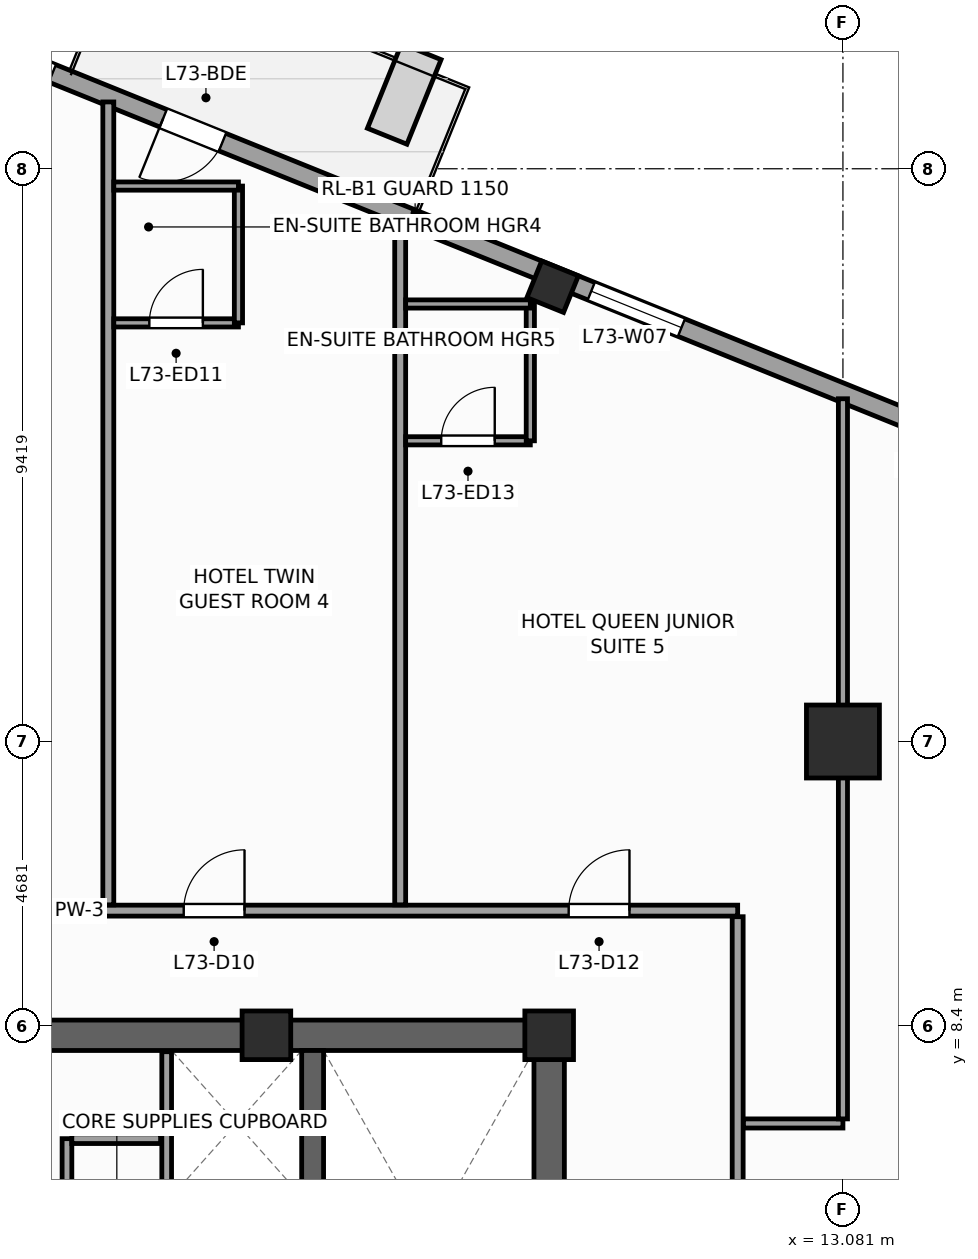
"""IFC4 building model, lengths in metres.
Left out: names, types, materials, properties, quantities, classifications, styles, units other than length and angle.
Written with IfcOpenShell. Run it as: python <this file> out.ifc"""

import sys

from ifc_helpers import new_model, si_unit, direction, frame, frame_2d, origin, origin_2d, place, context, subcontext, project, spatial, rectangle, extrude, source, transform, mapped, element, fill, save


model = new_model("IFC4")
c1 = context("Model", 3, precision=1e-05, world=origin(), true_north=direction((0.0, 1.0)))
c2 = subcontext(c1, "Body", "Model", "MODEL_VIEW")
j1 = project(units=[si_unit("LENGTHUNIT", "METRE"), si_unit("PLANEANGLEUNIT", "RADIAN")], contexts=[c1])
p1 = place(None, origin())
s1 = spatial("IfcSite", under=j1, at=p1, CompositionType="ELEMENT")
p2 = place(p1, origin())
s2 = spatial("IfcBuilding", under=s1, at=p2, CompositionType="ELEMENT")
p3 = place(p2, frame((0.0, 0.0, 297.6)))
s3 = spatial("IfcBuildingStorey", under=s2, at=p3, CompositionType="ELEMENT", Elevation=297.6)
p4 = place(p3, frame((-8.5, 8.25, 0.0), z_axis=(0.0, 0.0, 1.0), x_axis=(1.0, 0.0, 0.0)))
e1 = element("IfcWall", 1, at=p4, inside=s3, PredefinedType="SHEAR", context=c2, shape_type="SweptSolid", body=[
    extrude(rectangle(XDim=17.0, YDim=0.5, at=frame_2d((8.5, 0.0))), origin(), (0.0, 0.0, 1.0), 3.6),
])
p5 = place(p3, frame((8.25, -8.0, 0.0), z_axis=(0.0, 0.0, 1.0), x_axis=(0.0, 1.0, 0.0)))
e2 = element("IfcWall", 2, at=p5, inside=s3, PredefinedType="SHEAR", context=c2, shape_type="SweptSolid", body=[
    extrude(rectangle(XDim=16.0, YDim=0.5, at=frame_2d((8.0, 0.0))), origin(), (0.0, 0.0, 1.0), 3.6),
])
p6 = place(p5, frame((4.69, 0.0, 0.0)))
e3 = element("IfcOpeningElement", 3, at=p6, cuts=e2, PredefinedType="OPENING", context=c2, shape_type="SweptSolid", body=[
    extrude(rectangle(XDim=1.3, YDim=2.2, at=frame_2d((0.65, 1.1))), frame((0.0, 0.26, 0.0), z_axis=(0.0, -1.0, 0.0), x_axis=(1.0, 0.0, 0.0)), (0.0, 0.0, 1.0), 0.52),
])
p7 = place(p3, frame((4.36, -8.0, 0.0), z_axis=(0.0, 0.0, 1.0), x_axis=(0.0, 1.0, 0.0)))
e4 = element("IfcWall", 4, at=p7, inside=s3, PredefinedType="SHEAR", context=c2, shape_type="SweptSolid", body=[
    extrude(rectangle(XDim=16.0, YDim=0.36, at=frame_2d((8.0, 0.0))), origin(), (0.0, 0.0, 1.0), 3.6),
])
m1 = source(origin(), c2, "Body", "SweptSolid", [
    extrude(rectangle(XDim=0.8, YDim=0.8, at=origin_2d()), origin(), (0.0, 0.0, 1.0), 3.6),
])
for number, where, z_axis, x_axis in (
    (5, (8.25, 8.25, 0.0), (0.0, 0.0, 1.0), (1.0, 0.0, 0.0)),
    (6, (3.6, 8.25, 0.0), (0.0, 0.0, 1.0), (1.0, 0.0, 0.0)),
):
    element("IfcColumn", number, at=place(p3, frame(where, z_axis=z_axis, x_axis=x_axis)), inside=s3, PredefinedType="PILASTER", context=c2, shape_type="MappedRepresentation", body=[
        mapped(m1, transform((0.0, 0.0, 0.0), scale=1.0)),
    ])
m2 = source(origin(), c2, "Body", "SweptSolid", [
    extrude(rectangle(XDim=1.2, YDim=1.2, at=origin_2d()), origin(), (0.0, 0.0, 1.0), 3.6),
])
p8 = place(p3, frame((13.081, 13.081, 0.0), z_axis=(0.0, 0.0, 1.0), x_axis=(1.0, 0.0, 0.0)))
e7 = element("IfcColumn", 7, at=p8, inside=s3, PredefinedType="COLUMN", context=c2, shape_type="MappedRepresentation", body=[
    mapped(m2, transform((0.0, 0.0, 0.0), scale=1.0)),
])
m3 = source(origin(), c2, "Body", "SweptSolid", [
    extrude(rectangle(XDim=0.65, YDim=0.65, at=origin_2d()), origin(), (0.0, 0.0, 1.0), 3.6),
])
p9 = place(p3, frame((8.307, 20.56, 0.0), z_axis=(0.0, 0.0, 1.0), x_axis=(0.374606593416, 0.927183854567, 0.0)))
e8 = element("IfcColumn", 8, at=p9, inside=s3, PredefinedType="COLUMN", context=c2, shape_type="MappedRepresentation", body=[
    mapped(m3, transform((0.0, 0.0, 0.0), scale=1.0)),
])
p10 = place(p3, frame((23.813, 14.479, 0.0), z_axis=(0.0, 0.0, 1.0), x_axis=(-0.927182657188, 0.374609557019, 0.0)))
e9 = element("IfcWall", 9, at=p10, inside=s3, PredefinedType="STANDARD", context=c2, shape_type="SweptSolid", body=[
    extrude(rectangle(XDim=33.31, YDim=0.31, at=frame_2d((16.655, 0.0))), origin(), (0.0, 0.0, 1.0), 2.75),
])
p11 = place(p10, frame((22.58, 0.0, 0.0)))
e10 = element("IfcOpeningElement", 10, at=p11, cuts=e9, PredefinedType="OPENING", context=c2, shape_type="SweptSolid", body=[
    extrude(rectangle(XDim=1.05, YDim=2.25, at=frame_2d((0.525, 1.125))), frame((0.0, 0.165, 0.0), z_axis=(0.0, -1.0, 0.0), x_axis=(1.0, 0.0, 0.0)), (0.0, 0.0, 1.0), 0.33),
])
p12 = place(p10, frame((3.197, 0.0, 0.47)))
e11 = element("IfcOpeningElement", 11, at=p12, cuts=e9, PredefinedType="OPENING", context=c2, shape_type="SweptSolid", body=[
    extrude(rectangle(XDim=1.6, YDim=2.1, at=frame_2d((0.8, 1.05))), frame((0.0, 0.165, 0.0), z_axis=(0.0, -1.0, 0.0), x_axis=(1.0, 0.0, 0.0)), (0.0, 0.0, 1.0), 0.33),
])
p13 = place(p10, frame((8.86, 0.0, 0.47)))
e12 = element("IfcOpeningElement", 12, at=p13, cuts=e9, PredefinedType="OPENING", context=c2, shape_type="SweptSolid", body=[
    extrude(rectangle(XDim=1.6, YDim=2.1, at=frame_2d((0.8, 1.05))), frame((0.0, 0.165, 0.0), z_axis=(0.0, -1.0, 0.0), x_axis=(1.0, 0.0, 0.0)), (0.0, 0.0, 1.0), 0.33),
])
p14 = place(p10, frame((14.439, 0.0, 0.47)))
e13 = element("IfcOpeningElement", 13, at=p14, cuts=e9, PredefinedType="OPENING", context=c2, shape_type="SweptSolid", body=[
    extrude(rectangle(XDim=1.6, YDim=2.1, at=frame_2d((0.8, 1.05))), frame((0.0, 0.165, 0.0), z_axis=(0.0, -1.0, 0.0), x_axis=(1.0, 0.0, 0.0)), (0.0, 0.0, 1.0), 0.33),
])
p15 = place(p10, frame((25.597, 0.0, 0.47)))
e14 = element("IfcOpeningElement", 14, at=p15, cuts=e9, PredefinedType="OPENING", context=c2, shape_type="SweptSolid", body=[
    extrude(rectangle(XDim=1.6, YDim=2.1, at=frame_2d((0.8, 1.05))), frame((0.0, 0.165, 0.0), z_axis=(0.0, -1.0, 0.0), x_axis=(1.0, 0.0, 0.0)), (0.0, 0.0, 1.0), 0.33),
])
p16 = place(p3, frame((1.96, 4.58, 0.0), z_axis=(0.0, 0.0, 1.0), x_axis=(0.0, 1.0, 0.0)))
e15 = element("IfcWall", 15, at=p16, inside=s3, PredefinedType="PARTITIONING", context=c2, shape_type="SweptSolid", body=[
    extrude(rectangle(XDim=3.4, YDim=0.16, at=frame_2d((1.7, 0.0))), origin(), (0.0, 0.0, 1.0), 3.35),
])
p17 = place(p3, frame((0.32, 4.6, 0.0), z_axis=(0.0, 0.0, 1.0), x_axis=(0.0, 1.0, 0.0)))
e16 = element("IfcWall", 16, at=p17, inside=s3, PredefinedType="PARTITIONING", context=c2, shape_type="SweptSolid", body=[
    extrude(rectangle(XDim=1.95, YDim=0.16, at=frame_2d((0.975, 0.0))), origin(), (0.0, 0.0, 1.0), 3.35),
])
p18 = place(p3, frame((0.4, 6.55, 0.0), z_axis=(0.0, 0.0, 1.0), x_axis=(1.0, 0.0, 0.0)))
e17 = element("IfcWall", 17, at=p18, inside=s3, PredefinedType="PARTITIONING", context=c2, shape_type="SweptSolid", body=[
    extrude(rectangle(XDim=1.46, YDim=0.16, at=frame_2d((0.73, 0.0))), origin(), (0.0, 0.0, 1.0), 3.35),
])
p19 = place(p3, frame((-10.3, 10.3, 0.0), z_axis=(0.0, 0.0, 1.0), x_axis=(1.0, 0.0, 0.0)))
e18 = element("IfcWall", 18, at=p19, inside=s3, PredefinedType="PARTITIONING", context=c2, shape_type="SweptSolid", body=[
    extrude(rectangle(XDim=21.65, YDim=0.18, at=frame_2d((10.825, 0.0))), origin(), (0.0, 0.0, 1.0), 3.35),
])
p20 = place(p19, frame((2.564, 0.0, 0.0)))
e19 = element("IfcOpeningElement", 19, at=p20, cuts=e18, PredefinedType="OPENING", context=c2, shape_type="SweptSolid", body=[
    extrude(rectangle(XDim=1.0, YDim=2.15, at=frame_2d((0.5, 1.075))), frame((0.0, 0.1, 0.0), z_axis=(0.0, -1.0, 0.0), x_axis=(1.0, 0.0, 0.0)), (0.0, 0.0, 1.0), 0.2),
])
p21 = place(p19, frame((8.05, 0.0, 0.0)))
e20 = element("IfcOpeningElement", 20, at=p21, cuts=e18, PredefinedType="OPENING", context=c2, shape_type="SweptSolid", body=[
    extrude(rectangle(XDim=1.0, YDim=2.15, at=frame_2d((0.5, 1.075))), frame((0.0, 0.1, 0.0), z_axis=(0.0, -1.0, 0.0), x_axis=(1.0, 0.0, 0.0)), (0.0, 0.0, 1.0), 0.2),
])
p22 = place(p19, frame((12.54, 0.0, 0.0)))
e21 = element("IfcOpeningElement", 21, at=p22, cuts=e18, PredefinedType="OPENING", context=c2, shape_type="SweptSolid", body=[
    extrude(rectangle(XDim=1.0, YDim=2.15, at=frame_2d((0.5, 1.075))), frame((0.0, 0.1, 0.0), z_axis=(0.0, -1.0, 0.0), x_axis=(1.0, 0.0, 0.0)), (0.0, 0.0, 1.0), 0.2),
])
p23 = place(p19, frame((18.871, 0.0, 0.0)))
e22 = element("IfcOpeningElement", 22, at=p23, cuts=e18, PredefinedType="OPENING", context=c2, shape_type="SweptSolid", body=[
    extrude(rectangle(XDim=1.0, YDim=2.15, at=frame_2d((0.5, 1.075))), frame((0.0, 0.1, 0.0), z_axis=(0.0, -1.0, 0.0), x_axis=(1.0, 0.0, 0.0)), (0.0, 0.0, 1.0), 0.2),
])
p24 = place(p3, frame((11.35, -12.35, 0.0), z_axis=(0.0, 0.0, 1.0), x_axis=(0.0, 1.0, 0.0)))
e23 = element("IfcWall", 23, at=p24, inside=s3, PredefinedType="PARTITIONING", context=c2, shape_type="SweptSolid", body=[
    extrude(rectangle(XDim=22.55, YDim=0.18, at=frame_2d((11.275, 0.0))), origin(), (0.0, 0.0, 1.0), 3.35),
])
p25 = place(p24, frame((17.15, 0.0, 0.0)))
e24 = element("IfcOpeningElement", 24, at=p25, cuts=e23, PredefinedType="OPENING", context=c2, shape_type="SweptSolid", body=[
    extrude(rectangle(XDim=1.0, YDim=2.15, at=frame_2d((0.5, 1.075))), frame((0.0, 0.1, 0.0), z_axis=(0.0, -1.0, 0.0), x_axis=(1.0, 0.0, 0.0)), (0.0, 0.0, 1.0), 0.2),
])
p26 = place(p24, frame((13.5, 0.0, 0.0)))
e25 = element("IfcOpeningElement", 25, at=p26, cuts=e23, PredefinedType="OPENING", context=c2, shape_type="SweptSolid", body=[
    extrude(rectangle(XDim=1.0, YDim=2.15, at=frame_2d((0.5, 1.075))), frame((0.0, 0.1, 0.0), z_axis=(0.0, -1.0, 0.0), x_axis=(1.0, 0.0, 0.0)), (0.0, 0.0, 1.0), 0.2),
])
p27 = place(p24, frame((9.5, 0.0, 0.0)))
e26 = element("IfcOpeningElement", 26, at=p27, cuts=e23, PredefinedType="OPENING", context=c2, shape_type="SweptSolid", body=[
    extrude(rectangle(XDim=1.0, YDim=2.15, at=frame_2d((0.5, 1.075))), frame((0.0, 0.1, 0.0), z_axis=(0.0, -1.0, 0.0), x_axis=(1.0, 0.0, 0.0)), (0.0, 0.0, 1.0), 0.2),
])
p28 = place(p24, frame((6.35, 0.0, 0.0)))
e27 = element("IfcOpeningElement", 27, at=p28, cuts=e23, PredefinedType="OPENING", context=c2, shape_type="SweptSolid", body=[
    extrude(rectangle(XDim=1.0, YDim=2.15, at=frame_2d((0.5, 1.075))), frame((0.0, 0.1, 0.0), z_axis=(0.0, -1.0, 0.0), x_axis=(1.0, 0.0, 0.0)), (0.0, 0.0, 1.0), 0.2),
])
p29 = place(p24, frame((2.439, 0.0, 0.0)))
e28 = element("IfcOpeningElement", 28, at=p29, cuts=e23, PredefinedType="OPENING", context=c2, shape_type="SweptSolid", body=[
    extrude(rectangle(XDim=1.0, YDim=2.15, at=frame_2d((0.5, 1.075))), frame((0.0, 0.1, 0.0), z_axis=(0.0, -1.0, 0.0), x_axis=(1.0, 0.0, 0.0)), (0.0, 0.0, 1.0), 0.2),
])
p30 = place(p3, frame((1.0, 10.395, 0.0), z_axis=(0.0, 0.0, 1.0), x_axis=(0.0, 1.0, 0.0)))
e29 = element("IfcWall", 29, at=p30, inside=s3, PredefinedType="PARTITIONING", context=c2, shape_type="SweptSolid", body=[
    extrude(rectangle(XDim=13.204, YDim=0.18, at=frame_2d((6.602, 0.0))), origin(), (0.0, 0.0, 1.0), 3.35),
])
p31 = place(p3, frame((5.8, 10.395, 0.0), z_axis=(0.0, 0.0, 1.0), x_axis=(0.0, 1.0, 0.0)))
e30 = element("IfcWall", 30, at=p31, inside=s3, PredefinedType="PARTITIONING", context=c2, shape_type="SweptSolid", body=[
    extrude(rectangle(XDim=11.264, YDim=0.18, at=frame_2d((5.632, 0.0))), origin(), (0.0, 0.0, 1.0), 3.35),
])
p32 = place(p3, frame((11.445, 6.8, 0.0), z_axis=(0.0, 0.0, 1.0), x_axis=(1.0, 0.0, 0.0)))
e31 = element("IfcWall", 31, at=p32, inside=s3, PredefinedType="PARTITIONING", context=c2, shape_type="SweptSolid", body=[
    extrude(rectangle(XDim=1.636, YDim=0.15, at=frame_2d((0.818, 0.0))), origin(), (0.0, 0.0, 1.0), 3.35),
])
p33 = place(p3, frame((13.081, 6.875, 0.0), z_axis=(0.0, 0.0, 1.0), x_axis=(0.0, 1.0, 0.0)))
e32 = element("IfcWall", 32, at=p33, inside=s3, PredefinedType="PARTITIONING", context=c2, shape_type="SweptSolid", body=[
    extrude(rectangle(XDim=11.843, YDim=0.15, at=frame_2d((5.921, 0.0))), origin(), (0.0, 0.0, 1.0), 2.45),
])
p34 = place(p3, frame((1.09, 19.965, 0.0), z_axis=(0.0, 0.0, 1.0), x_axis=(1.0, 0.0, 0.0)))
e33 = element("IfcWall", 33, at=p34, inside=s3, PredefinedType="PARTITIONING", context=c2, shape_type="SweptSolid", body=[
    extrude(rectangle(XDim=2.05, YDim=0.135, at=frame_2d((1.025, 0.0))), origin(), (0.0, 0.0, 1.0), 3.35),
])
p35 = place(p34, frame((0.585, 0.0, 0.0)))
e34 = element("IfcOpeningElement", 34, at=p35, cuts=e33, PredefinedType="OPENING", context=c2, shape_type="SweptSolid", body=[
    extrude(rectangle(XDim=0.88, YDim=2.1, at=frame_2d((0.44, 1.05))), frame((0.0, 0.078, 0.0), z_axis=(0.0, -1.0, 0.0), x_axis=(1.0, 0.0, 0.0)), (0.0, 0.0, 1.0), 0.155),
])
p36 = place(p3, frame((3.14, 19.965, 0.0), z_axis=(0.0, 0.0, 1.0), x_axis=(0.0, 1.0, 0.0)))
e35 = element("IfcWall", 35, at=p36, inside=s3, PredefinedType="PARTITIONING", context=c2, shape_type="SweptSolid", body=[
    extrude(rectangle(XDim=2.25, YDim=0.135, at=frame_2d((1.125, 0.0))), origin(), (0.0, 0.0, 1.0), 3.35),
])
p37 = place(p3, frame((1.09, 22.215, 0.0), z_axis=(0.0, 0.0, 1.0), x_axis=(1.0, 0.0, 0.0)))
e36 = element("IfcWall", 36, at=p37, inside=s3, PredefinedType="PARTITIONING", context=c2, shape_type="SweptSolid", body=[
    extrude(rectangle(XDim=2.05, YDim=0.135, at=frame_2d((1.025, 0.0))), origin(), (0.0, 0.0, 1.0), 3.35),
])
p38 = place(p3, frame((5.89, 18.026, 0.0), z_axis=(0.0, 0.0, 1.0), x_axis=(1.0, 0.0, 0.0)))
e37 = element("IfcWall", 37, at=p38, inside=s3, PredefinedType="PARTITIONING", context=c2, shape_type="SweptSolid", body=[
    extrude(rectangle(XDim=2.05, YDim=0.135, at=frame_2d((1.025, 0.0))), origin(), (0.0, 0.0, 1.0), 2.95),
])
p39 = place(p38, frame((0.585, 0.0, 0.0)))
e38 = element("IfcOpeningElement", 38, at=p39, cuts=e37, PredefinedType="OPENING", context=c2, shape_type="SweptSolid", body=[
    extrude(rectangle(XDim=0.88, YDim=2.1, at=frame_2d((0.44, 1.05))), frame((0.0, 0.078, 0.0), z_axis=(0.0, -1.0, 0.0), x_axis=(1.0, 0.0, 0.0)), (0.0, 0.0, 1.0), 0.155),
])
p40 = place(p3, frame((7.94, 18.026, 0.0), z_axis=(0.0, 0.0, 1.0), x_axis=(0.0, 1.0, 0.0)))
e39 = element("IfcWall", 39, at=p40, inside=s3, PredefinedType="PARTITIONING", context=c2, shape_type="SweptSolid", body=[
    extrude(rectangle(XDim=2.25, YDim=0.135, at=frame_2d((1.125, 0.0))), origin(), (0.0, 0.0, 1.0), 3.35),
])
p41 = place(p3, frame((5.89, 20.276, 0.0), z_axis=(0.0, 0.0, 1.0), x_axis=(1.0, 0.0, 0.0)))
e40 = element("IfcWall", 40, at=p41, inside=s3, PredefinedType="PARTITIONING", context=c2, shape_type="SweptSolid", body=[
    extrude(rectangle(XDim=2.05, YDim=0.135, at=frame_2d((1.025, 0.0))), origin(), (0.0, 0.0, 1.0), 3.35),
])
m4 = source(origin(), c2, "Body", "SweptSolid", [
    extrude(rectangle(XDim=1.05, YDim=2.25, at=frame_2d((0.525, 1.125))), frame((0.0, 0.025, 0.0), z_axis=(0.0, -1.0, 0.0), x_axis=(1.0, 0.0, 0.0)), (0.0, 0.0, 1.0), 0.05),
])
p42 = place(p11, origin())
e41 = element("IfcDoor", 41, at=p42, inside=s3, OperationType="SINGLE_SWING_RIGHT", PredefinedType="DOOR", context=c2, shape_type="MappedRepresentation", body=[
    mapped(m4, transform((0.0, 0.0, 0.0), scale=1.0)),
])
fill(e10, e41)
m5 = source(origin(), c2, "Body", "SweptSolid", [
    extrude(rectangle(XDim=1.6, YDim=2.1, at=frame_2d((0.8, 1.05))), frame((0.0, 0.03, 0.0), z_axis=(0.0, -1.0, 0.0), x_axis=(1.0, 0.0, 0.0)), (0.0, 0.0, 1.0), 0.06),
])
p43 = place(p14, origin())
e42 = element("IfcWindow", 42, at=p43, inside=s3, PartitioningType="SINGLE_PANEL", PredefinedType="WINDOW", context=c2, shape_type="MappedRepresentation", body=[
    mapped(m5, transform((0.0, 0.0, 0.0), scale=1.0)),
])
fill(e13, e42)
p44 = place(p15, origin())
e43 = element("IfcWindow", 43, at=p44, inside=s3, PartitioningType="SINGLE_PANEL", PredefinedType="WINDOW", context=c2, shape_type="MappedRepresentation", body=[
    mapped(m5, transform((0.0, 0.0, 0.0), scale=1.0)),
])
fill(e14, e43)
m6 = source(origin(), c2, "Body", "SweptSolid", [
    extrude(rectangle(XDim=1.0, YDim=2.15, at=frame_2d((0.5, 1.075))), frame((0.0, 0.025, 0.0), z_axis=(0.0, -1.0, 0.0), x_axis=(1.0, 0.0, 0.0)), (0.0, 0.0, 1.0), 0.05),
])
p45 = place(p22, origin())
e44 = element("IfcDoor", 44, at=p45, inside=s3, OperationType="SINGLE_SWING_RIGHT", PredefinedType="DOOR", context=c2, shape_type="MappedRepresentation", body=[
    mapped(m6, transform((0.0, 0.0, 0.0), scale=1.0)),
])
fill(e21, e44)
m7 = source(origin(), c2, "Body", "SweptSolid", [
    extrude(rectangle(XDim=0.88, YDim=2.1, at=frame_2d((0.44, 1.05))), frame((0.0, 0.025, 0.0), z_axis=(0.0, -1.0, 0.0), x_axis=(1.0, 0.0, 0.0)), (0.0, 0.0, 1.0), 0.05),
])
p46 = place(p35, origin())
e45 = element("IfcDoor", 45, at=p46, inside=s3, OperationType="SINGLE_SWING_RIGHT", PredefinedType="DOOR", context=c2, shape_type="MappedRepresentation", body=[
    mapped(m7, transform((0.0, 0.0, 0.0), scale=1.0)),
])
fill(e34, e45)
p47 = place(p23, origin())
e46 = element("IfcDoor", 46, at=p47, inside=s3, OperationType="SINGLE_SWING_RIGHT", PredefinedType="DOOR", context=c2, shape_type="MappedRepresentation", body=[
    mapped(m6, transform((0.0, 0.0, 0.0), scale=1.0)),
])
fill(e22, e46)
p48 = place(p39, origin())
e47 = element("IfcDoor", 47, at=p48, inside=s3, OperationType="SINGLE_SWING_RIGHT", PredefinedType="DOOR", context=c2, shape_type="MappedRepresentation", body=[
    mapped(m7, transform((0.0, 0.0, 0.0), scale=1.0)),
])
fill(e38, e47)
save(model, sys.argv[1])
